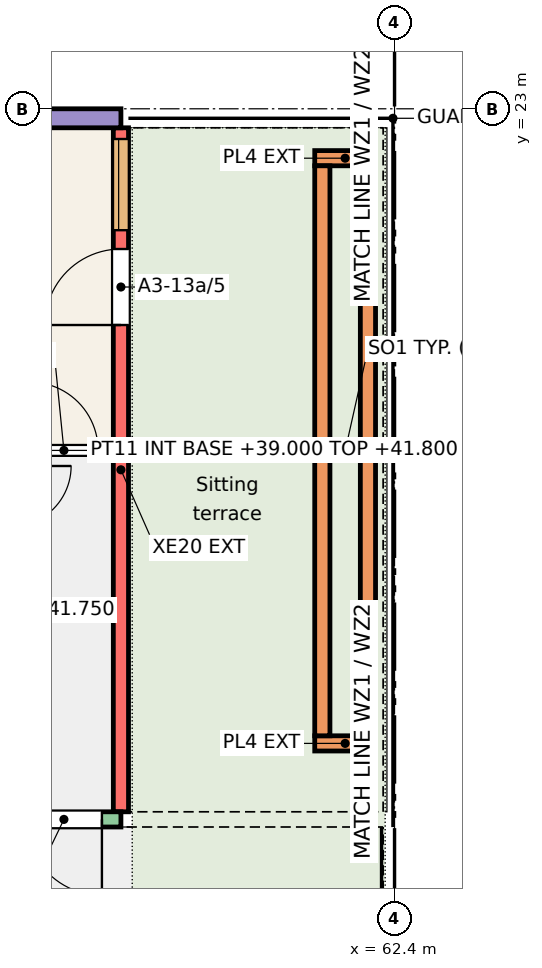
"""IFC4 building model, lengths in metres.
Left out: names, types, materials, properties, quantities, classifications, styles, units other than length and angle.
Written with IfcOpenShell. Run it as: python <this file> out.ifc"""

import sys

from ifc_helpers import new_model, si_unit, direction, frame, frame_2d, origin, place, context, subcontext, project, spatial, rectangle, extrude, element, fill, save


model = new_model("IFC4")
c1 = context("Model", 3, precision=1e-05, world=origin(), true_north=direction((0.0, 1.0)))
c2 = subcontext(c1, "Body", "Model", "MODEL_VIEW")
j1 = project(units=[si_unit("LENGTHUNIT", "METRE"), si_unit("PLANEANGLEUNIT", "RADIAN")], contexts=[c1])
p1 = place(None, origin())
s1 = spatial("IfcSite", under=j1, at=p1, CompositionType="ELEMENT")
p2 = place(p1, origin())
s2 = spatial("IfcBuilding", under=s1, at=p2, CompositionType="ELEMENT")
p3 = place(p2, frame((0.0, 0.0, 39.0)))
s3 = spatial("IfcBuildingStorey", under=s2, at=p3, CompositionType="ELEMENT", Elevation=39.0)
p4 = place(p3, frame((58.8, 13.75, 0.0), z_axis=(0.0, 0.0, 1.0), x_axis=(0.0, 1.0, 0.0)))
e1 = element("IfcWall", 1, at=p4, inside=s3, PredefinedType="SHEAR", context=c2, shape_type="SweptSolid", body=[
    extrude(rectangle(XDim=9.0, YDim=0.2, at=frame_2d((4.5, 0.0))), origin(), (0.0, 0.0, 1.0), 3.0),
])
p5 = place(p4, frame((7.653, 0.0, 0.9)))
e2 = element("IfcOpeningElement", 2, at=p5, cuts=e1, PredefinedType="OPENING", context=c2, shape_type="SweptSolid", body=[
    extrude(rectangle(XDim=1.2, YDim=1.5, at=frame_2d((0.6, 0.75))), frame((0.0, 0.11, 0.0), z_axis=(0.0, -1.0, 0.0), x_axis=(1.0, 0.0, 0.0)), (0.0, 0.0, 1.0), 0.22),
])
p6 = place(p4, frame((6.405, 0.0, 0.0)))
e3 = element("IfcOpeningElement", 3, at=p6, cuts=e1, PredefinedType="OPENING", context=c2, shape_type="SweptSolid", body=[
    extrude(rectangle(XDim=1.0, YDim=2.1, at=frame_2d((0.5, 1.05))), frame((0.0, 0.11, 0.0), z_axis=(0.0, -1.0, 0.0), x_axis=(1.0, 0.0, 0.0)), (0.0, 0.0, 1.0), 0.22),
])
p7 = place(p3, frame((55.2, 22.875, 0.0), z_axis=(0.0, 0.0, 1.0), x_axis=(1.0, 0.0, 0.0)))
e4 = element("IfcWall", 4, at=p7, inside=s3, PredefinedType="SOLIDWALL", context=c2, shape_type="SweptSolid", body=[
    extrude(rectangle(XDim=3.6, YDim=0.25, at=frame_2d((1.8, 0.0))), origin(), (0.0, 0.0, 1.0), 3.0),
])
p8 = place(p7, frame((1.2, 0.0, 0.8)))
e5 = element("IfcOpeningElement", 5, at=p8, cuts=e4, PredefinedType="OPENING", context=c2, shape_type="SweptSolid", body=[
    extrude(rectangle(XDim=1.2, YDim=1.6, at=frame_2d((0.6, 0.8))), frame((0.0, 0.135, 0.0), z_axis=(0.0, -1.0, 0.0), x_axis=(1.0, 0.0, 0.0)), (0.0, 0.0, 1.0), 0.27),
])
p9 = place(p3, frame((55.2, 13.65, 0.0), z_axis=(0.0, 0.0, 1.0), x_axis=(1.0, 0.0, 0.0)))
e6 = element("IfcWall", 6, at=p9, inside=s3, PredefinedType="SOLIDWALL", context=c2, shape_type="SweptSolid", body=[
    extrude(rectangle(XDim=3.6, YDim=0.2, at=frame_2d((1.8, 0.0))), origin(), (0.0, 0.0, 1.0), 3.0),
])
p10 = place(p9, frame((0.495, 0.0, 1.1)))
e7 = element("IfcOpeningElement", 7, at=p10, cuts=e6, PredefinedType="OPENING", context=c2, shape_type="SweptSolid", body=[
    extrude(rectangle(XDim=1.2, YDim=1.3, at=frame_2d((0.6, 0.65))), frame((0.0, 0.11, 0.0), z_axis=(0.0, -1.0, 0.0), x_axis=(1.0, 0.0, 0.0)), (0.0, 0.0, 1.0), 0.22),
])
p11 = place(p9, frame((2.35, 0.0, 0.0)))
e8 = element("IfcOpeningElement", 8, at=p11, cuts=e6, PredefinedType="OPENING", context=c2, shape_type="SweptSolid", body=[
    extrude(rectangle(XDim=1.0, YDim=2.1, at=frame_2d((0.5, 1.05))), frame((0.0, 0.11, 0.0), z_axis=(0.0, -1.0, 0.0), x_axis=(1.0, 0.0, 0.0)), (0.0, 0.0, 1.0), 0.22),
])
for number, where, z_axis, x_axis in (
    (9, (61.35, 14.65, 0.01), (0.0, 0.0, 1.0), (1.0, 0.0, 0.0)),
    (10, (61.35, 22.35, 0.01), (0.0, 0.0, 1.0), (1.0, 0.0, 0.0)),
):
    element("IfcWall", number, at=place(p3, frame(where, z_axis=z_axis, x_axis=x_axis)), inside=s3, PredefinedType="SOLIDWALL", context=c2, shape_type="SweptSolid", body=[
        extrude(rectangle(XDim=0.8, YDim=0.2, at=frame_2d((0.4, 0.0))), origin(), (0.0, 0.0, 1.0), 0.45),
    ])
for number, where, z_axis, x_axis in (
    (11, (61.45, 14.75, 0.01), (0.0, 0.0, 1.0), (0.0, 1.0, 0.0)),
    (12, (62.05, 14.75, 0.01), (0.0, 0.0, 1.0), (0.0, 1.0, 0.0)),
):
    element("IfcWall", number, at=place(p3, frame(where, z_axis=z_axis, x_axis=x_axis)), inside=s3, PredefinedType="SOLIDWALL", context=c2, shape_type="SweptSolid", body=[
        extrude(rectangle(XDim=7.5, YDim=0.2, at=frame_2d((3.75, 0.0))), origin(), (0.0, 0.0, 1.0), 0.45),
    ])
p12 = place(p3, frame((55.3, 18.505, 0.0), z_axis=(0.0, 0.0, 1.0), x_axis=(1.0, 0.0, 0.0)))
e13 = element("IfcWall", 13, at=p12, inside=s3, PredefinedType="PARTITIONING", context=c2, shape_type="SweptSolid", body=[
    extrude(rectangle(XDim=3.4, YDim=0.11, at=frame_2d((1.7, 0.0))), origin(), (0.0, 0.0, 1.0), 2.75),
])
p13 = place(p12, frame((2.3, 0.0, 0.0)))
e14 = element("IfcOpeningElement", 14, at=p13, cuts=e13, PredefinedType="OPENING", context=c2, shape_type="SweptSolid", body=[
    extrude(rectangle(XDim=0.9, YDim=2.1, at=frame_2d((0.45, 1.05))), frame((0.0, 0.065, 0.0), z_axis=(0.0, -1.0, 0.0), x_axis=(1.0, 0.0, 0.0)), (0.0, 0.0, 1.0), 0.13),
])
p14 = place(p5, origin())
e15 = element("IfcWindow", 15, at=p14, inside=s3, PartitioningType="SINGLE_PANEL", PredefinedType="WINDOW", context=c2, shape_type="SweptSolid", body=[
    extrude(rectangle(XDim=1.2, YDim=1.5, at=frame_2d((0.6, 0.75))), frame((0.0, 0.06, 0.0), z_axis=(0.0, -1.0, 0.0), x_axis=(1.0, 0.0, 0.0)), (0.0, 0.0, 1.0), 0.06),
])
fill(e2, e15)
p15 = place(p11, origin())
e16 = element("IfcDoor", 16, at=p15, inside=s3, OperationType="SINGLE_SWING_RIGHT", PredefinedType="DOOR", context=c2, shape_type="SweptSolid", body=[
    extrude(rectangle(XDim=1.0, YDim=2.1, at=frame_2d((0.5, 1.05))), frame((0.0, 0.025, 0.0), z_axis=(0.0, -1.0, 0.0), x_axis=(1.0, 0.0, 0.0)), (0.0, 0.0, 1.0), 0.05),
])
fill(e8, e16)
p16 = place(p13, origin())
e17 = element("IfcDoor", 17, at=p16, inside=s3, OperationType="SINGLE_SWING_LEFT", PredefinedType="DOOR", context=c2, shape_type="SweptSolid", body=[
    extrude(rectangle(XDim=0.9, YDim=2.1, at=frame_2d((0.45, 1.05))), frame((0.0, 0.025, 0.0), z_axis=(0.0, -1.0, 0.0), x_axis=(1.0, 0.0, 0.0)), (0.0, 0.0, 1.0), 0.05),
])
fill(e14, e17)
p17 = place(p6, origin())
e18 = element("IfcDoor", 18, at=p17, inside=s3, OperationType="SINGLE_SWING_LEFT", PredefinedType="DOOR", context=c2, shape_type="SweptSolid", body=[
    extrude(rectangle(XDim=1.0, YDim=2.1, at=frame_2d((0.5, 1.05))), frame((0.0, 0.025, 0.0), z_axis=(0.0, -1.0, 0.0), x_axis=(1.0, 0.0, 0.0)), (0.0, 0.0, 1.0), 0.05),
])
fill(e3, e18)
save(model, sys.argv[1])
